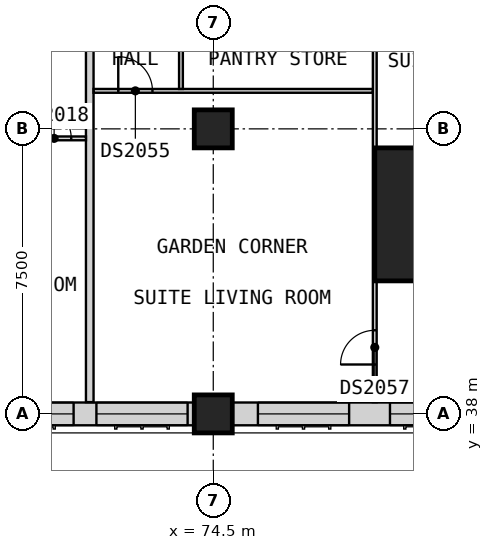
"""IFC4 building model, lengths in metres.
Left out: names, types, materials, properties, quantities, classifications, styles, units other than length and angle.
Written with IfcOpenShell. Run it as: python <this file> out.ifc"""

import sys

from ifc_helpers import new_model, si_unit, direction, frame, frame_2d, origin, origin_2d, place, context, subcontext, project, spatial, rectangle, extrude, element, fill, save


model = new_model("IFC4")
c1 = context("Model", 3, precision=1e-05, world=origin(), true_north=direction((0.0, 1.0)))
c2 = subcontext(c1, "Body", "Model", "MODEL_VIEW")
j1 = project(units=[si_unit("LENGTHUNIT", "METRE"), si_unit("PLANEANGLEUNIT", "RADIAN")], contexts=[c1])
p1 = place(None, origin())
s1 = spatial("IfcSite", under=j1, at=p1, CompositionType="ELEMENT")
p2 = place(p1, origin())
s2 = spatial("IfcBuilding", under=s1, at=p2, CompositionType="ELEMENT")
p3 = place(p2, frame((0.0, 0.0, 162.6)))
s3 = spatial("IfcBuildingStorey", under=s2, at=p3, CompositionType="ELEMENT", Elevation=162.6)
for number, where, z_axis, x_axis in (
    (1, (74.5, 38.0, 0.0), (0.0, 0.0, 1.0), (1.0, 0.0, 0.0)),
    (2, (74.5, 45.5, 0.0), (0.0, 0.0, 1.0), (1.0, 0.0, 0.0)),
):
    element("IfcColumn", number, at=place(p3, frame(where, z_axis=z_axis, x_axis=x_axis)), inside=s3, PredefinedType="COLUMN", context=c2, shape_type="SweptSolid", body=[
        extrude(rectangle(XDim=1.0, YDim=1.0, at=origin_2d()), origin(), (0.0, 0.0, 1.0), 3.6),
    ])
p4 = place(p3, frame((80.5, 43.25, 0.0), z_axis=(0.0, 0.0, 1.0), x_axis=(1.0, 0.0, 0.0)))
e3 = element("IfcColumn", 3, at=p4, inside=s3, PredefinedType="COLUMN", context=c2, shape_type="SweptSolid", body=[
    extrude(rectangle(XDim=3.5, YDim=3.5, at=origin_2d()), origin(), (0.0, 0.0, 1.0), 3.6),
])
p5 = place(p3, frame((68.0, 38.0, 0.0), z_axis=(0.0, 0.0, 1.0), x_axis=(1.0, 0.0, 0.0)))
e4 = element("IfcWall", 4, at=p5, inside=s3, PredefinedType="SOLIDWALL", context=c2, shape_type="SweptSolid", body=[
    extrude(rectangle(XDim=6.0, YDim=0.6, at=frame_2d((3.0, 0.0))), origin(), (0.0, 0.0, 1.0), 2.85),
])
p6 = place(p5, frame((0.425, 0.0, 0.8)))
e5 = element("IfcOpeningElement", 5, at=p6, cuts=e4, PredefinedType="OPENING", context=c2, shape_type="SweptSolid", body=[
    extrude(rectangle(XDim=2.4, YDim=1.8, at=frame_2d((1.2, 0.9))), frame((0.0, 0.31, 0.0), z_axis=(0.0, -1.0, 0.0), x_axis=(1.0, 0.0, 0.0)), (0.0, 0.0, 1.0), 0.62),
])
p7 = place(p5, frame((3.425, 0.0, 0.8)))
e6 = element("IfcOpeningElement", 6, at=p7, cuts=e4, PredefinedType="OPENING", context=c2, shape_type="SweptSolid", body=[
    extrude(rectangle(XDim=2.4, YDim=1.8, at=frame_2d((1.2, 0.9))), frame((0.0, 0.31, 0.0), z_axis=(0.0, -1.0, 0.0), x_axis=(1.0, 0.0, 0.0)), (0.0, 0.0, 1.0), 0.62),
])
p8 = place(p3, frame((75.0, 38.0, 0.0), z_axis=(0.0, 0.0, 1.0), x_axis=(1.0, 0.0, 0.0)))
e7 = element("IfcWall", 7, at=p8, inside=s3, PredefinedType="SOLIDWALL", context=c2, shape_type="SweptSolid", body=[
    extrude(rectangle(XDim=7.25, YDim=0.6, at=frame_2d((3.625, 0.0))), origin(), (0.0, 0.0, 1.0), 2.85),
])
p9 = place(p8, frame((0.675, 0.0, 0.8)))
e8 = element("IfcOpeningElement", 8, at=p9, cuts=e7, PredefinedType="OPENING", context=c2, shape_type="SweptSolid", body=[
    extrude(rectangle(XDim=2.4, YDim=1.8, at=frame_2d((1.2, 0.9))), frame((0.0, 0.31, 0.0), z_axis=(0.0, -1.0, 0.0), x_axis=(1.0, 0.0, 0.0)), (0.0, 0.0, 1.0), 0.62),
])
p10 = place(p8, frame((4.15, 0.0, 0.8)))
e9 = element("IfcOpeningElement", 9, at=p10, cuts=e7, PredefinedType="OPENING", context=c2, shape_type="SweptSolid", body=[
    extrude(rectangle(XDim=1.8, YDim=1.8, at=frame_2d((0.9, 0.9))), frame((0.0, 0.31, 0.0), z_axis=(0.0, -1.0, 0.0), x_axis=(1.0, 0.0, 0.0)), (0.0, 0.0, 1.0), 0.62),
])
p11 = place(p3, frame((71.25, 38.31, 0.0), z_axis=(0.0, 0.0, 1.0), x_axis=(0.0, 1.0, 0.0)))
e10 = element("IfcWall", 10, at=p11, inside=s3, PredefinedType="PARTITIONING", context=c2, shape_type="SweptSolid", body=[
    extrude(rectangle(XDim=11.715, YDim=0.2, at=frame_2d((5.857, 0.0))), origin(), (0.0, 0.0, 1.0), 3.2),
])
p12 = place(p3, frame((78.8, 42.0, 0.0), z_axis=(0.0, 0.0, 1.0), x_axis=(1.0, 0.0, 0.0)))
e11 = element("IfcWall", 11, at=p12, inside=s3, PredefinedType="PARTITIONING", context=c2, shape_type="SweptSolid", body=[
    extrude(rectangle(XDim=3.44, YDim=0.1, at=frame_2d((1.72, 0.0))), origin(), (0.0, 0.0, 1.0), 3.2),
])
p13 = place(p3, frame((69.438, 45.25, 0.0), z_axis=(0.0, 0.0, 1.0), x_axis=(1.0, 0.0, 0.0)))
e12 = element("IfcWall", 12, at=p13, inside=s3, PredefinedType="PARTITIONING", context=c2, shape_type="SweptSolid", body=[
    extrude(rectangle(XDim=1.712, YDim=0.1, at=frame_2d((0.856, 0.0))), origin(), (0.0, 0.0, 1.0), 3.2),
])
p14 = place(p13, frame((0.425, 0.0, 0.0)))
e13 = element("IfcOpeningElement", 13, at=p14, cuts=e12, PredefinedType="OPENING", context=c2, shape_type="SweptSolid", body=[
    extrude(rectangle(XDim=0.9, YDim=2.1, at=frame_2d((0.45, 1.05))), frame((0.0, 0.06, 0.0), z_axis=(0.0, -1.0, 0.0), x_axis=(1.0, 0.0, 0.0)), (0.0, 0.0, 1.0), 0.12),
])
p15 = place(p3, frame((71.35, 46.5, 0.0), z_axis=(0.0, 0.0, 1.0), x_axis=(1.0, 0.0, 0.0)))
e14 = element("IfcWall", 14, at=p15, inside=s3, PredefinedType="PARTITIONING", context=c2, shape_type="SweptSolid", body=[
    extrude(rectangle(XDim=7.35, YDim=0.1, at=frame_2d((3.675, 0.0))), origin(), (0.0, 0.0, 1.0), 3.2),
])
p16 = place(p15, frame((0.65, 0.0, 0.0)))
e15 = element("IfcOpeningElement", 15, at=p16, cuts=e14, PredefinedType="OPENING", context=c2, shape_type="SweptSolid", body=[
    extrude(rectangle(XDim=0.9, YDim=2.1, at=frame_2d((0.45, 1.05))), frame((0.0, 0.06, 0.0), z_axis=(0.0, -1.0, 0.0), x_axis=(1.0, 0.0, 0.0)), (0.0, 0.0, 1.0), 0.12),
])
p17 = place(p3, frame((73.65, 46.55, 0.0), z_axis=(0.0, 0.0, 1.0), x_axis=(0.0, 1.0, 0.0)))
e16 = element("IfcWall", 16, at=p17, inside=s3, PredefinedType="PARTITIONING", context=c2, shape_type="SweptSolid", body=[
    extrude(rectangle(XDim=3.475, YDim=0.1, at=frame_2d((1.737, 0.0))), origin(), (0.0, 0.0, 1.0), 3.2),
])
p18 = place(p17, frame((1.3, 0.0, 0.0)))
e17 = element("IfcOpeningElement", 17, at=p18, cuts=e16, PredefinedType="OPENING", context=c2, shape_type="SweptSolid", body=[
    extrude(rectangle(XDim=0.9, YDim=2.1, at=frame_2d((0.45, 1.05))), frame((0.0, 0.06, 0.0), z_axis=(0.0, -1.0, 0.0), x_axis=(1.0, 0.0, 0.0)), (0.0, 0.0, 1.0), 0.12),
])
p19 = place(p3, frame((78.75, 38.31, 0.0), z_axis=(0.0, 0.0, 1.0), x_axis=(0.0, 1.0, 0.0)))
e18 = element("IfcWall", 18, at=p19, inside=s3, PredefinedType="PARTITIONING", context=c2, shape_type="SweptSolid", body=[
    extrude(rectangle(XDim=11.728, YDim=0.1, at=frame_2d((5.864, 0.0))), origin(), (0.0, 0.0, 1.0), 3.2),
])
p20 = place(p19, frame((0.99, 0.0, 0.0)))
e19 = element("IfcOpeningElement", 19, at=p20, cuts=e18, PredefinedType="OPENING", context=c2, shape_type="SweptSolid", body=[
    extrude(rectangle(XDim=0.9, YDim=2.1, at=frame_2d((0.45, 1.05))), frame((0.0, 0.06, 0.0), z_axis=(0.0, -1.0, 0.0), x_axis=(1.0, 0.0, 0.0)), (0.0, 0.0, 1.0), 0.12),
])
p21 = place(p19, frame((9.54, 0.0, 0.0)))
e20 = element("IfcOpeningElement", 20, at=p21, cuts=e18, PredefinedType="OPENING", context=c2, shape_type="SweptSolid", body=[
    extrude(rectangle(XDim=0.9, YDim=2.1, at=frame_2d((0.45, 1.05))), frame((0.0, 0.06, 0.0), z_axis=(0.0, -1.0, 0.0), x_axis=(1.0, 0.0, 0.0)), (0.0, 0.0, 1.0), 0.12),
])
p22 = place(p6, origin())
e21 = element("IfcWindow", 21, at=p22, inside=s3, PartitioningType="SINGLE_PANEL", PredefinedType="WINDOW", context=c2, shape_type="SweptSolid", body=[
    extrude(rectangle(XDim=2.4, YDim=1.8, at=frame_2d((1.2, 0.9))), frame((0.0, -0.07, 0.0), z_axis=(0.0, -1.0, 0.0), x_axis=(1.0, 0.0, 0.0)), (0.0, 0.0, 1.0), 0.06),
])
fill(e5, e21)
p23 = place(p7, origin())
e22 = element("IfcWindow", 22, at=p23, inside=s3, PartitioningType="SINGLE_PANEL", PredefinedType="WINDOW", context=c2, shape_type="SweptSolid", body=[
    extrude(rectangle(XDim=2.4, YDim=1.8, at=frame_2d((1.2, 0.9))), frame((0.0, -0.07, 0.0), z_axis=(0.0, -1.0, 0.0), x_axis=(1.0, 0.0, 0.0)), (0.0, 0.0, 1.0), 0.06),
])
fill(e6, e22)
p24 = place(p9, origin())
e23 = element("IfcWindow", 23, at=p24, inside=s3, PartitioningType="SINGLE_PANEL", PredefinedType="WINDOW", context=c2, shape_type="SweptSolid", body=[
    extrude(rectangle(XDim=2.4, YDim=1.8, at=frame_2d((1.2, 0.9))), frame((0.0, -0.07, 0.0), z_axis=(0.0, -1.0, 0.0), x_axis=(1.0, 0.0, 0.0)), (0.0, 0.0, 1.0), 0.06),
])
fill(e8, e23)
p25 = place(p10, origin())
e24 = element("IfcWindow", 24, at=p25, inside=s3, PartitioningType="SINGLE_PANEL", PredefinedType="WINDOW", context=c2, shape_type="SweptSolid", body=[
    extrude(rectangle(XDim=1.8, YDim=1.8, at=frame_2d((0.9, 0.9))), frame((0.0, -0.07, 0.0), z_axis=(0.0, -1.0, 0.0), x_axis=(1.0, 0.0, 0.0)), (0.0, 0.0, 1.0), 0.06),
])
fill(e9, e24)
p26 = place(p14, origin())
e25 = element("IfcDoor", 25, at=p26, inside=s3, OperationType="SINGLE_SWING_LEFT", PredefinedType="DOOR", context=c2, shape_type="SweptSolid", body=[
    extrude(rectangle(XDim=0.9, YDim=2.1, at=frame_2d((0.45, 1.05))), frame((0.0, 0.025, 0.0), z_axis=(0.0, -1.0, 0.0), x_axis=(1.0, 0.0, 0.0)), (0.0, 0.0, 1.0), 0.05),
])
fill(e13, e25)
p27 = place(p16, origin())
e26 = element("IfcDoor", 26, at=p27, inside=s3, OperationType="SINGLE_SWING_RIGHT", PredefinedType="DOOR", context=c2, shape_type="SweptSolid", body=[
    extrude(rectangle(XDim=0.9, YDim=2.1, at=frame_2d((0.45, 1.05))), frame((0.0, 0.025, 0.0), z_axis=(0.0, -1.0, 0.0), x_axis=(1.0, 0.0, 0.0)), (0.0, 0.0, 1.0), 0.05),
])
fill(e15, e26)
p28 = place(p20, origin())
e27 = element("IfcDoor", 27, at=p28, inside=s3, OperationType="SINGLE_SWING_LEFT", PredefinedType="DOOR", context=c2, shape_type="SweptSolid", body=[
    extrude(rectangle(XDim=0.9, YDim=2.1, at=frame_2d((0.45, 1.05))), frame((0.0, 0.025, 0.0), z_axis=(0.0, -1.0, 0.0), x_axis=(1.0, 0.0, 0.0)), (0.0, 0.0, 1.0), 0.05),
])
fill(e19, e27)
save(model, sys.argv[1])
